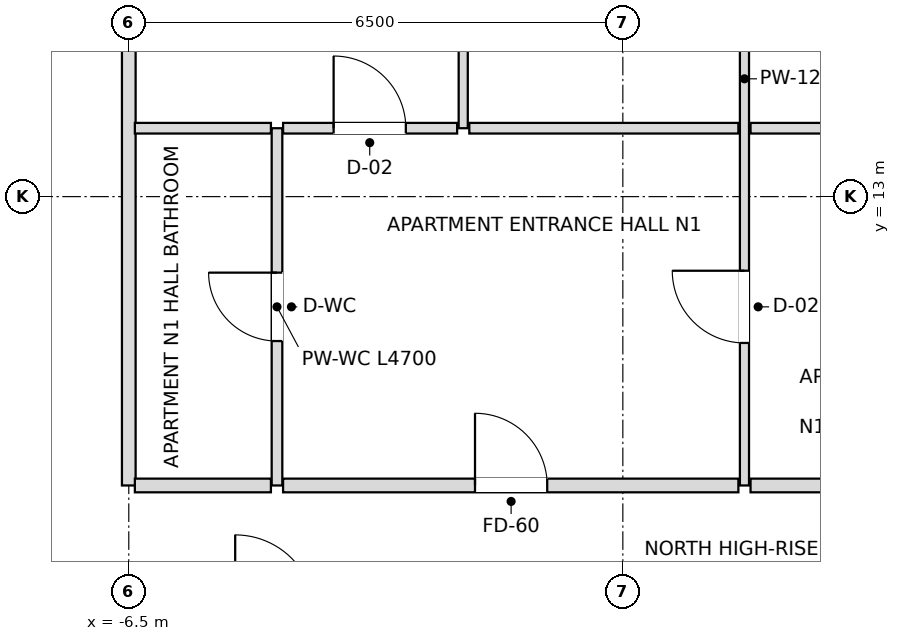
"""IFC4 building model, lengths in metres.
Left out: names, types, materials, properties, quantities, classifications, styles, units other than length and angle.
Written with IfcOpenShell. Run it as: python <this file> out.ifc"""

import sys

from ifc_helpers import new_model, si_unit, direction, frame, frame_2d, origin, place, context, subcontext, project, spatial, rectangle, extrude, element, fill, save


model = new_model("IFC4")
c1 = context("Model", 3, precision=1e-05, world=origin(), true_north=direction((0.0, 1.0)))
c2 = subcontext(c1, "Body", "Model", "MODEL_VIEW")
j1 = project(units=[si_unit("LENGTHUNIT", "METRE"), si_unit("PLANEANGLEUNIT", "RADIAN")], contexts=[c1])
p1 = place(None, origin())
s1 = spatial("IfcSite", under=j1, at=p1, CompositionType="ELEMENT")
p2 = place(p1, origin())
s2 = spatial("IfcBuilding", under=s1, at=p2, CompositionType="ELEMENT")
p3 = place(p2, frame((0.0, 0.0, 254.7)))
s3 = spatial("IfcBuildingStorey", under=s2, at=p3, CompositionType="ELEMENT", Elevation=254.7)
p4 = place(p3, frame((-6.5, 9.2, 0.0), z_axis=(0.0, 0.0, 1.0), x_axis=(0.0, 1.0, 0.0)))
e1 = element("IfcWall", 1, at=p4, inside=s3, PredefinedType="PARTITIONING", context=c2, shape_type="SweptSolid", body=[
    extrude(rectangle(XDim=10.7, YDim=0.18, at=frame_2d((5.35, 0.0))), origin(), (0.0, 0.0, 1.0), 2.826),
])
p5 = place(p3, frame((-4.55, 9.2, 0.0), z_axis=(0.0, 0.0, 1.0), x_axis=(0.0, 1.0, 0.0)))
e2 = element("IfcWall", 2, at=p5, inside=s3, PredefinedType="PARTITIONING", context=c2, shape_type="SweptSolid", body=[
    extrude(rectangle(XDim=4.7, YDim=0.14, at=frame_2d((2.35, 0.0))), origin(), (0.0, 0.0, 1.0), 3.38),
])
p6 = place(p5, frame((1.9, 0.0, 0.0)))
e3 = element("IfcOpeningElement", 3, at=p6, cuts=e2, PredefinedType="OPENING", context=c2, shape_type="SweptSolid", body=[
    extrude(rectangle(XDim=0.9, YDim=2.1, at=frame_2d((0.45, 1.05))), frame((0.0, 0.08, 0.0), z_axis=(0.0, -1.0, 0.0), x_axis=(1.0, 0.0, 0.0)), (0.0, 0.0, 1.0), 0.16),
])
p7 = place(p3, frame((-2.1, 13.9, 0.0), z_axis=(0.0, 0.0, 1.0), x_axis=(0.0, 1.0, 0.0)))
e4 = element("IfcWall", 4, at=p7, inside=s3, PredefinedType="PARTITIONING", context=c2, shape_type="SweptSolid", body=[
    extrude(rectangle(XDim=6.0, YDim=0.12, at=frame_2d((3.0, 0.0))), origin(), (0.0, 0.0, 1.0), 3.018),
])
p8 = place(p7, frame((2.55, 0.0, 0.0)))
e5 = element("IfcOpeningElement", 5, at=p8, cuts=e4, PredefinedType="OPENING", context=c2, shape_type="SweptSolid", body=[
    extrude(rectangle(XDim=0.9, YDim=2.1, at=frame_2d((0.45, 1.05))), frame((0.0, 0.07, 0.0), z_axis=(0.0, -1.0, 0.0), x_axis=(1.0, 0.0, 0.0)), (0.0, 0.0, 1.0), 0.14),
])
p9 = place(p3, frame((1.6, 9.2, 0.0), z_axis=(0.0, 0.0, 1.0), x_axis=(0.0, 1.0, 0.0)))
e6 = element("IfcWall", 6, at=p9, inside=s3, PredefinedType="PARTITIONING", context=c2, shape_type="SweptSolid", body=[
    extrude(rectangle(XDim=10.7, YDim=0.12, at=frame_2d((5.35, 0.0))), origin(), (0.0, 0.0, 1.0), 3.018),
])
p10 = place(p9, frame((1.875, 0.0, 0.0)))
e7 = element("IfcOpeningElement", 7, at=p10, cuts=e6, PredefinedType="OPENING", context=c2, shape_type="SweptSolid", body=[
    extrude(rectangle(XDim=0.95, YDim=2.1, at=frame_2d((0.475, 1.05))), frame((0.0, 0.07, 0.0), z_axis=(0.0, -1.0, 0.0), x_axis=(1.0, 0.0, 0.0)), (0.0, 0.0, 1.0), 0.14),
])
p11 = place(p9, frame((7.25, 0.0, 0.0)))
e8 = element("IfcOpeningElement", 8, at=p11, cuts=e6, PredefinedType="OPENING", context=c2, shape_type="SweptSolid", body=[
    extrude(rectangle(XDim=0.9, YDim=2.1, at=frame_2d((0.45, 1.05))), frame((0.0, 0.07, 0.0), z_axis=(0.0, -1.0, 0.0), x_axis=(1.0, 0.0, 0.0)), (0.0, 0.0, 1.0), 0.14),
])
p12 = place(p3, frame((-6.42, 9.2, 0.0), z_axis=(0.0, 0.0, 1.0), x_axis=(1.0, 0.0, 0.0)))
e9 = element("IfcWall", 9, at=p12, inside=s3, PredefinedType="PARTITIONING", context=c2, shape_type="SweptSolid", body=[
    extrude(rectangle(XDim=1.79, YDim=0.18, at=frame_2d((0.895, 0.0))), origin(), (0.0, 0.0, 1.0), 3.38),
])
p13 = place(p3, frame((-4.47, 9.2, 0.0), z_axis=(0.0, 0.0, 1.0), x_axis=(1.0, 0.0, 0.0)))
e10 = element("IfcWall", 10, at=p13, inside=s3, PredefinedType="PARTITIONING", context=c2, shape_type="SweptSolid", body=[
    extrude(rectangle(XDim=5.99, YDim=0.18, at=frame_2d((2.995, 0.0))), origin(), (0.0, 0.0, 1.0), 3.38),
])
p14 = place(p13, frame((2.525, 0.0, 0.0)))
e11 = element("IfcOpeningElement", 11, at=p14, cuts=e10, PredefinedType="OPENING", context=c2, shape_type="SweptSolid", body=[
    extrude(rectangle(XDim=0.95, YDim=2.15, at=frame_2d((0.475, 1.075))), frame((0.0, 0.1, 0.0), z_axis=(0.0, -1.0, 0.0), x_axis=(1.0, 0.0, 0.0)), (0.0, 0.0, 1.0), 0.2),
])
p15 = place(p3, frame((1.68, 9.2, 0.0), z_axis=(0.0, 0.0, 1.0), x_axis=(1.0, 0.0, 0.0)))
e12 = element("IfcWall", 12, at=p15, inside=s3, PredefinedType="PARTITIONING", context=c2, shape_type="SweptSolid", body=[
    extrude(rectangle(XDim=2.69, YDim=0.18, at=frame_2d((1.345, 0.0))), origin(), (0.0, 0.0, 1.0), 3.38),
])
p16 = place(p3, frame((-6.42, 13.9, 0.0), z_axis=(0.0, 0.0, 1.0), x_axis=(1.0, 0.0, 0.0)))
e13 = element("IfcWall", 13, at=p16, inside=s3, PredefinedType="PARTITIONING", context=c2, shape_type="SweptSolid", body=[
    extrude(rectangle(XDim=1.79, YDim=0.14, at=frame_2d((0.895, 0.0))), origin(), (0.0, 0.0, 1.0), 3.38),
])
p17 = place(p3, frame((-4.47, 13.9, 0.0), z_axis=(0.0, 0.0, 1.0), x_axis=(1.0, 0.0, 0.0)))
e14 = element("IfcWall", 14, at=p17, inside=s3, PredefinedType="PARTITIONING", context=c2, shape_type="SweptSolid", body=[
    extrude(rectangle(XDim=2.29, YDim=0.14, at=frame_2d((1.145, 0.0))), origin(), (0.0, 0.0, 1.0), 3.38),
])
p18 = place(p17, frame((0.665, 0.0, 0.0)))
e15 = element("IfcOpeningElement", 15, at=p18, cuts=e14, PredefinedType="OPENING", context=c2, shape_type="SweptSolid", body=[
    extrude(rectangle(XDim=0.95, YDim=2.1, at=frame_2d((0.475, 1.05))), frame((0.0, 0.08, 0.0), z_axis=(0.0, -1.0, 0.0), x_axis=(1.0, 0.0, 0.0)), (0.0, 0.0, 1.0), 0.16),
])
p19 = place(p3, frame((-2.02, 13.9, 0.0), z_axis=(0.0, 0.0, 1.0), x_axis=(1.0, 0.0, 0.0)))
e16 = element("IfcWall", 16, at=p19, inside=s3, PredefinedType="PARTITIONING", context=c2, shape_type="SweptSolid", body=[
    extrude(rectangle(XDim=3.54, YDim=0.14, at=frame_2d((1.77, 0.0))), origin(), (0.0, 0.0, 1.0), 3.38),
])
p20 = place(p3, frame((1.68, 13.9, 0.0), z_axis=(0.0, 0.0, 1.0), x_axis=(1.0, 0.0, 0.0)))
e17 = element("IfcWall", 17, at=p20, inside=s3, PredefinedType="PARTITIONING", context=c2, shape_type="SweptSolid", body=[
    extrude(rectangle(XDim=2.69, YDim=0.14, at=frame_2d((1.345, 0.0))), origin(), (0.0, 0.0, 1.0), 3.38),
])
p21 = place(p6, origin())
e18 = element("IfcDoor", 18, at=p21, inside=s3, OperationType="SINGLE_SWING_RIGHT", PredefinedType="DOOR", context=c2, shape_type="SweptSolid", body=[
    extrude(rectangle(XDim=0.9, YDim=2.1, at=frame_2d((0.45, 1.05))), frame((0.0, 0.025, 0.0), z_axis=(0.0, -1.0, 0.0), x_axis=(1.0, 0.0, 0.0)), (0.0, 0.0, 1.0), 0.05),
])
fill(e3, e18)
p22 = place(p14, origin())
e19 = element("IfcDoor", 19, at=p22, inside=s3, OperationType="SINGLE_SWING_LEFT", PredefinedType="DOOR", context=c2, shape_type="SweptSolid", body=[
    extrude(rectangle(XDim=0.95, YDim=2.15, at=frame_2d((0.475, 1.075))), frame((0.0, 0.025, 0.0), z_axis=(0.0, -1.0, 0.0), x_axis=(1.0, 0.0, 0.0)), (0.0, 0.0, 1.0), 0.05),
])
fill(e11, e19)
p23 = place(p10, origin())
e20 = element("IfcDoor", 20, at=p23, inside=s3, OperationType="SINGLE_SWING_RIGHT", PredefinedType="DOOR", context=c2, shape_type="SweptSolid", body=[
    extrude(rectangle(XDim=0.95, YDim=2.1, at=frame_2d((0.475, 1.05))), frame((0.0, 0.025, 0.0), z_axis=(0.0, -1.0, 0.0), x_axis=(1.0, 0.0, 0.0)), (0.0, 0.0, 1.0), 0.05),
])
fill(e7, e20)
p24 = place(p18, origin())
e21 = element("IfcDoor", 21, at=p24, inside=s3, OperationType="SINGLE_SWING_LEFT", PredefinedType="DOOR", context=c2, shape_type="SweptSolid", body=[
    extrude(rectangle(XDim=0.95, YDim=2.1, at=frame_2d((0.475, 1.05))), frame((0.0, 0.025, 0.0), z_axis=(0.0, -1.0, 0.0), x_axis=(1.0, 0.0, 0.0)), (0.0, 0.0, 1.0), 0.05),
])
fill(e15, e21)
save(model, sys.argv[1])
